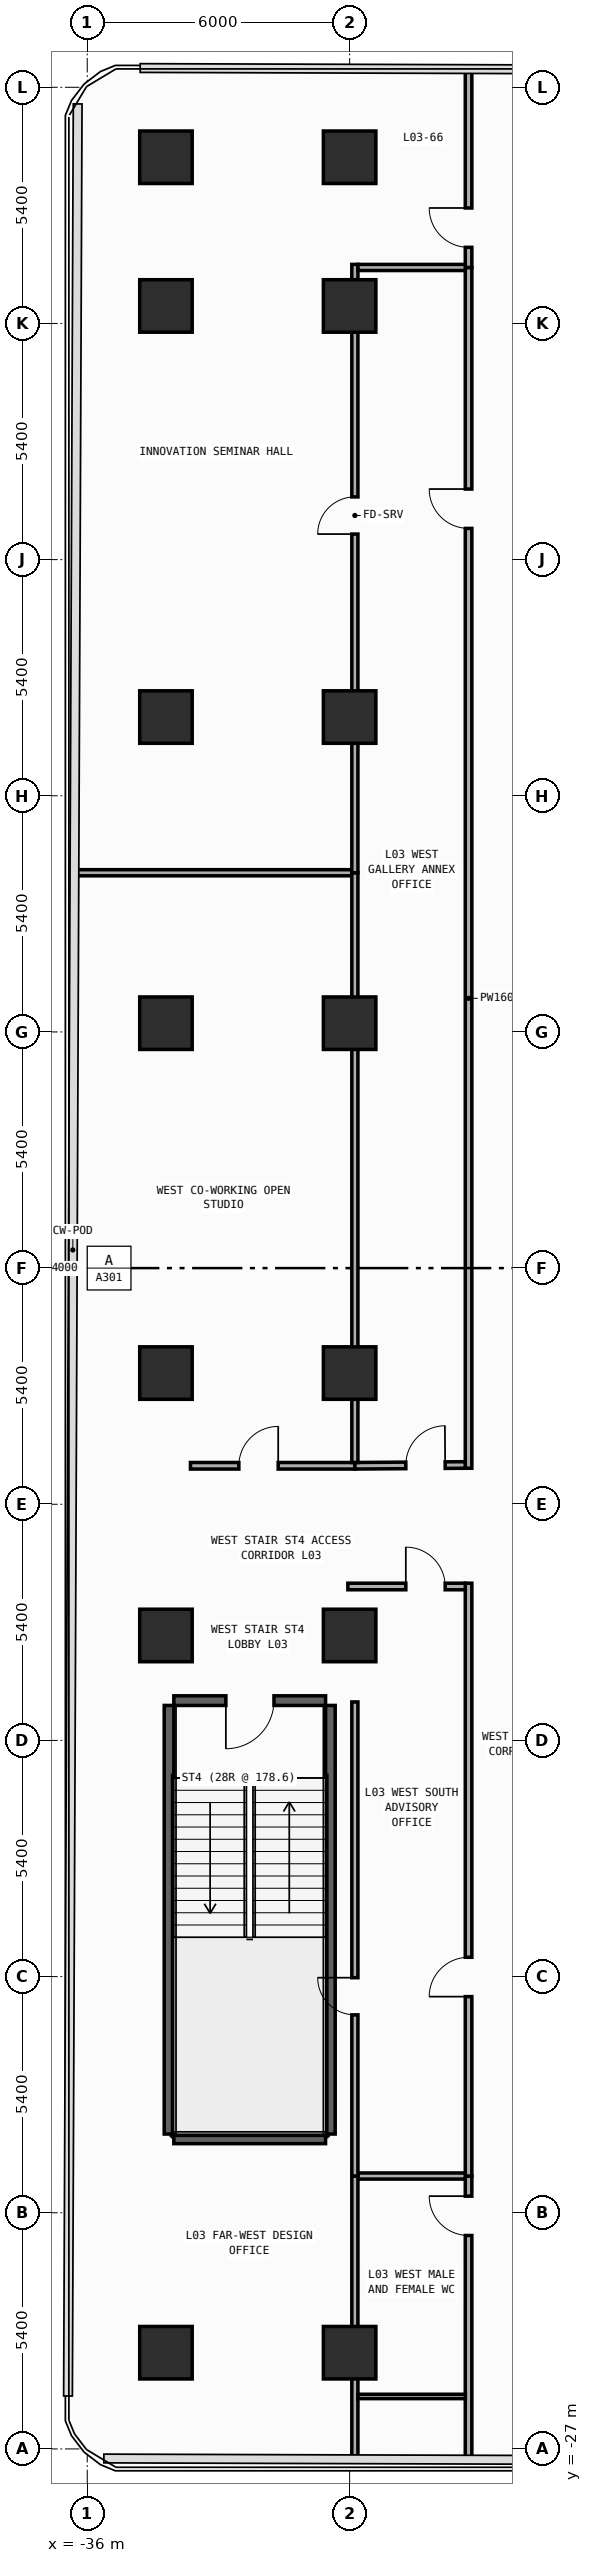
"""IFC4 building model, lengths in metres.
Left out: names, types, materials, properties, quantities, classifications, styles, units other than length and angle.
Written with IfcOpenShell. Run it as: python <this file> out.ifc"""

import sys

from ifc_helpers import new_model, si_unit, direction, frame, frame_2d, origin, origin_2d, place, context, subcontext, project, spatial, rectangle, extrude, element, fill, save


model = new_model("IFC4")
c1 = context("Model", 3, precision=1e-05, world=origin(), true_north=direction((0.0, 1.0)))
c2 = subcontext(c1, "Body", "Model", "MODEL_VIEW")
j1 = project(units=[si_unit("LENGTHUNIT", "METRE"), si_unit("PLANEANGLEUNIT", "RADIAN")], contexts=[c1])
p1 = place(None, origin())
s1 = spatial("IfcSite", under=j1, at=p1, CompositionType="ELEMENT")
p2 = place(p1, origin())
s2 = spatial("IfcBuilding", under=s1, at=p2, CompositionType="ELEMENT")
p3 = place(p2, frame((0.0, 0.0, 11.0)))
s3 = spatial("IfcBuildingStorey", under=s2, at=p3, CompositionType="ELEMENT", Elevation=11.0)
p4 = place(p3, frame((-30.55, -9.89, 0.0), z_axis=(0.0, 0.0, 1.0), x_axis=(-1.0, 0.0, 0.0)))
e1 = element("IfcWall", 1, at=p4, inside=s3, PredefinedType="SHEAR", context=c2, shape_type="SweptSolid", body=[
    extrude(rectangle(XDim=3.47, YDim=0.22, at=frame_2d((1.735, 0.0))), origin(), (0.0, 0.0, 1.0), 4.7),
])
p5 = place(p4, frame((1.18, 0.0, 0.0)))
e2 = element("IfcOpeningElement", 2, at=p5, cuts=e1, PredefinedType="OPENING", context=c2, shape_type="SweptSolid", body=[
    extrude(rectangle(XDim=1.1, YDim=2.2, at=frame_2d((0.55, 1.1))), frame((0.0, 0.12, 0.0), z_axis=(0.0, -1.0, 0.0), x_axis=(1.0, 0.0, 0.0)), (0.0, 0.0, 1.0), 0.24),
])
p6 = place(p3, frame((-34.02, -19.91, 0.0), z_axis=(0.0, 0.0, 1.0), x_axis=(1.0, 0.0, 0.0)))
e3 = element("IfcWall", 3, at=p6, inside=s3, PredefinedType="SHEAR", context=c2, shape_type="SweptSolid", body=[
    extrude(rectangle(XDim=3.47, YDim=0.22, at=frame_2d((1.735, 0.0))), origin(), (0.0, 0.0, 1.0), 4.7),
])
for number, where, z_axis, x_axis in (
    (4, (-34.13, -19.8, 0.0), (0.0, 0.0, 1.0), (0.0, 1.0, 0.0)),
    (5, (-30.44, -19.8, 0.0), (0.0, 0.0, 1.0), (0.0, 1.0, 0.0)),
):
    element("IfcWall", number, at=place(p3, frame(where, z_axis=z_axis, x_axis=x_axis)), inside=s3, PredefinedType="SHEAR", context=c2, shape_type="SweptSolid", body=[
        extrude(rectangle(XDim=9.8, YDim=0.22, at=frame_2d((4.9, 0.0))), origin(), (0.0, 0.0, 1.0), 4.7),
    ])
for number, where, z_axis, x_axis in (
    (6, (-34.2, -24.8, 0.0), (0.0, 0.0, 1.0), (1.0, 0.0, 0.0)),
    (7, (-34.2, -8.4, 0.0), (0.0, 0.0, 1.0), (1.0, 0.0, 0.0)),
    (8, (-34.2, -2.4, 0.0), (0.0, 0.0, 1.0), (1.0, 0.0, 0.0)),
    (9, (-34.2, 5.6, 0.0), (0.0, 0.0, 1.0), (1.0, 0.0, 0.0)),
    (10, (-34.2, 12.6, 0.0), (0.0, 0.0, 1.0), (1.0, 0.0, 0.0)),
    (11, (-34.2, 22.0, 0.0), (0.0, 0.0, 1.0), (1.0, 0.0, 0.0)),
    (12, (-34.2, 25.4, 0.0), (0.0, 0.0, 1.0), (1.0, 0.0, 0.0)),
    (13, (-30.0, -24.8, 0.0), (0.0, 0.0, 1.0), (1.0, 0.0, 0.0)),
    (14, (-30.0, -8.4, 0.0), (0.0, 0.0, 1.0), (1.0, 0.0, 0.0)),
    (15, (-30.0, -2.4, 0.0), (0.0, 0.0, 1.0), (1.0, 0.0, 0.0)),
    (16, (-30.0, 5.6, 0.0), (0.0, 0.0, 1.0), (1.0, 0.0, 0.0)),
    (17, (-30.0, 12.6, 0.0), (0.0, 0.0, 1.0), (1.0, 0.0, 0.0)),
    (18, (-30.0, 22.0, 0.0), (0.0, 0.0, 1.0), (1.0, 0.0, 0.0)),
    (19, (-30.0, 25.4, 0.0), (0.0, 0.0, 1.0), (1.0, 0.0, 0.0)),
):
    element("IfcColumn", number, at=place(p3, frame(where, z_axis=z_axis, x_axis=x_axis)), inside=s3, PredefinedType="COLUMN", context=c2, shape_type="SweptSolid", body=[
        extrude(rectangle(XDim=1.2, YDim=1.2, at=origin_2d()), origin(), (0.0, 0.0, 1.0), 5.0),
    ])
p7 = place(p3, frame((-27.28, -27.249, 0.0), z_axis=(0.0, 0.0, 1.0), x_axis=(0.0, 1.0, 0.0)))
e20 = element("IfcWall", 20, at=p7, inside=s3, PredefinedType="PARTITIONING", context=c2, shape_type="SweptSolid", body=[
    extrude(rectangle(XDim=6.489, YDim=0.15, at=frame_2d((3.245, 0.0))), origin(), (0.0, 0.0, 1.0), 4.7),
])
p8 = place(p7, frame((5.129, 0.0, 0.0)))
e21 = element("IfcOpeningElement", 21, at=p8, cuts=e20, PredefinedType="OPENING", context=c2, shape_type="SweptSolid", body=[
    extrude(rectangle(XDim=0.9, YDim=2.15, at=frame_2d((0.45, 1.075))), frame((0.0, 0.085, 0.0), z_axis=(0.0, -1.0, 0.0), x_axis=(1.0, 0.0, 0.0)), (0.0, 0.0, 1.0), 0.17),
])
p9 = place(p3, frame((-27.28, -20.76, 0.0), z_axis=(0.0, 0.0, 1.0), x_axis=(0.0, 1.0, 0.0)))
e22 = element("IfcWall", 22, at=p9, inside=s3, PredefinedType="PARTITIONING", context=c2, shape_type="SweptSolid", body=[
    extrude(rectangle(XDim=13.555, YDim=0.15, at=frame_2d((6.777, 0.0))), origin(), (0.0, 0.0, 1.0), 4.7),
])
p10 = place(p9, frame((4.102, 0.0, 0.0)))
e23 = element("IfcOpeningElement", 23, at=p10, cuts=e22, PredefinedType="OPENING", context=c2, shape_type="SweptSolid", body=[
    extrude(rectangle(XDim=0.9, YDim=2.15, at=frame_2d((0.45, 1.075))), frame((0.0, 0.085, 0.0), z_axis=(0.0, -1.0, 0.0), x_axis=(1.0, 0.0, 0.0)), (0.0, 0.0, 1.0), 0.17),
])
p11 = place(p3, frame((-27.28, -4.576, 0.0), z_axis=(0.0, 0.0, 1.0), x_axis=(0.0, 1.0, 0.0)))
e24 = element("IfcWall", 24, at=p11, inside=s3, PredefinedType="PARTITIONING", context=c2, shape_type="SweptSolid", body=[
    extrude(rectangle(XDim=27.456, YDim=0.15, at=frame_2d((13.728, 0.0))), origin(), (0.0, 0.0, 1.0), 4.7),
])
p12 = place(p11, frame((21.49, 0.0, 0.0)))
e25 = element("IfcOpeningElement", 25, at=p12, cuts=e24, PredefinedType="OPENING", context=c2, shape_type="SweptSolid", body=[
    extrude(rectangle(XDim=0.9, YDim=2.15, at=frame_2d((0.45, 1.075))), frame((0.0, 0.085, 0.0), z_axis=(0.0, -1.0, 0.0), x_axis=(1.0, 0.0, 0.0)), (0.0, 0.0, 1.0), 0.17),
])
p13 = place(p3, frame((-27.28, 22.88, 0.0), z_axis=(0.0, 0.0, 1.0), x_axis=(0.0, 1.0, 0.0)))
e26 = element("IfcWall", 26, at=p13, inside=s3, PredefinedType="PARTITIONING", context=c2, shape_type="SweptSolid", body=[
    extrude(rectangle(XDim=4.542, YDim=0.15, at=frame_2d((2.271, 0.0))), origin(), (0.0, 0.0, 1.0), 4.7),
])
p14 = place(p13, frame((0.46, 0.0, 0.0)))
e27 = element("IfcOpeningElement", 27, at=p14, cuts=e26, PredefinedType="OPENING", context=c2, shape_type="SweptSolid", body=[
    extrude(rectangle(XDim=0.9, YDim=2.15, at=frame_2d((0.45, 1.075))), frame((0.0, 0.085, 0.0), z_axis=(0.0, -1.0, 0.0), x_axis=(1.0, 0.0, 0.0)), (0.0, 0.0, 1.0), 0.17),
])
p15 = place(p3, frame((-33.64, -4.52, 0.0), z_axis=(0.0, 0.0, 1.0), x_axis=(1.0, 0.0, 0.0)))
e28 = element("IfcWall", 28, at=p15, inside=s3, PredefinedType="PARTITIONING", context=c2, shape_type="SweptSolid", body=[
    extrude(rectangle(XDim=3.76, YDim=0.15, at=frame_2d((1.88, 0.0))), origin(), (0.0, 0.0, 1.0), 4.7),
])
p16 = place(p15, frame((1.107, 0.0, 0.0)))
e29 = element("IfcOpeningElement", 29, at=p16, cuts=e28, PredefinedType="OPENING", context=c2, shape_type="SweptSolid", body=[
    extrude(rectangle(XDim=0.9, YDim=2.15, at=frame_2d((0.45, 1.075))), frame((0.0, 0.085, 0.0), z_axis=(0.0, -1.0, 0.0), x_axis=(1.0, 0.0, 0.0)), (0.0, 0.0, 1.0), 0.17),
])
p17 = place(p3, frame((-30.04, -7.28, 0.0), z_axis=(0.0, 0.0, 1.0), x_axis=(1.0, 0.0, 0.0)))
e30 = element("IfcWall", 30, at=p17, inside=s3, PredefinedType="PARTITIONING", context=c2, shape_type="SweptSolid", body=[
    extrude(rectangle(XDim=2.685, YDim=0.15, at=frame_2d((1.343, 0.0))), origin(), (0.0, 0.0, 1.0), 4.7),
])
p18 = place(p17, frame((1.325, 0.0, 0.0)))
e31 = element("IfcOpeningElement", 31, at=p18, cuts=e30, PredefinedType="OPENING", context=c2, shape_type="SweptSolid", body=[
    extrude(rectangle(XDim=0.9, YDim=2.15, at=frame_2d((0.45, 1.075))), frame((0.0, 0.085, 0.0), z_axis=(0.0, -1.0, 0.0), x_axis=(1.0, 0.0, 0.0)), (0.0, 0.0, 1.0), 0.17),
])
p19 = place(p3, frame((-29.88, -4.52, 0.0), z_axis=(0.0, 0.0, 1.0), x_axis=(0.999973705414, 0.007251791521, 0.0)))
e32 = element("IfcWall", 32, at=p19, inside=s3, PredefinedType="PARTITIONING", context=c2, shape_type="SweptSolid", body=[
    extrude(rectangle(XDim=2.525, YDim=0.15, at=frame_2d((1.262, 0.0))), origin(), (0.0, 0.0, 1.0), 4.7),
])
p20 = place(p19, frame((1.165, 0.0, 0.0)))
e33 = element("IfcOpeningElement", 33, at=p20, cuts=e32, PredefinedType="OPENING", context=c2, shape_type="SweptSolid", body=[
    extrude(rectangle(XDim=0.9, YDim=2.15, at=frame_2d((0.45, 1.075))), frame((0.0, 0.085, 0.0), z_axis=(0.0, -1.0, 0.0), x_axis=(1.0, 0.0, 0.0)), (0.0, 0.0, 1.0), 0.17),
])
p21 = place(p3, frame((-36.297, 9.04, 0.0), z_axis=(0.0, 0.0, 1.0), x_axis=(1.0, 0.0, 0.0)))
e34 = element("IfcWall", 34, at=p21, inside=s3, PredefinedType="PARTITIONING", context=c2, shape_type="SweptSolid", body=[
    extrude(rectangle(XDim=6.347, YDim=0.14, at=frame_2d((3.174, 0.0))), origin(), (0.0, 0.0, 1.0), 4.7),
])
p22 = place(p3, frame((-29.88, -4.445, 0.0), z_axis=(0.0, 0.0, 1.0), x_axis=(0.0, 1.0, 0.0)))
e35 = element("IfcWall", 35, at=p22, inside=s3, PredefinedType="PARTITIONING", context=c2, shape_type="SweptSolid", body=[
    extrude(rectangle(XDim=13.485, YDim=0.14, at=frame_2d((6.743, 0.0))), origin(), (0.0, 0.0, 1.0), 3.8),
])
p23 = place(p3, frame((-29.88, 9.04, 0.0), z_axis=(0.0, 0.0, 1.0), x_axis=(0.0, 1.0, 0.0)))
e36 = element("IfcWall", 36, at=p23, inside=s3, PredefinedType="PARTITIONING", context=c2, shape_type="SweptSolid", body=[
    extrude(rectangle(XDim=13.91, YDim=0.14, at=frame_2d((6.955, 0.0))), origin(), (0.0, 0.0, 1.0), 3.8),
])
p24 = place(p23, frame((7.744, 0.0, 0.0)))
e37 = element("IfcOpeningElement", 37, at=p24, cuts=e36, PredefinedType="OPENING", context=c2, shape_type="SweptSolid", body=[
    extrude(rectangle(XDim=0.85, YDim=2.1, at=frame_2d((0.425, 1.05))), frame((0.0, 0.08, 0.0), z_axis=(0.0, -1.0, 0.0), x_axis=(1.0, 0.0, 0.0)), (0.0, 0.0, 1.0), 0.16),
])
p25 = place(p3, frame((-29.81, -20.76, 0.0), z_axis=(0.0, 0.0, 1.0), x_axis=(1.0, 0.0, 0.0)))
e38 = element("IfcWall", 38, at=p25, inside=s3, PredefinedType="PARTITIONING", context=c2, shape_type="SweptSolid", body=[
    extrude(rectangle(XDim=2.455, YDim=0.14, at=frame_2d((1.228, 0.0))), origin(), (0.0, 0.0, 1.0), 4.7),
])
p26 = place(p3, frame((-29.88, -27.241, 0.0), z_axis=(0.0, 0.0, 1.0), x_axis=(0.0, 1.0, 0.0)))
e39 = element("IfcWall", 39, at=p26, inside=s3, PredefinedType="PARTITIONING", context=c2, shape_type="SweptSolid", body=[
    extrude(rectangle(XDim=6.481, YDim=0.14, at=frame_2d((3.24, 0.0))), origin(), (0.0, 0.0, 1.0), 4.7),
])
p27 = place(p3, frame((-29.88, -20.76, 0.0), z_axis=(0.0, 0.0, 1.0), x_axis=(0.0, 1.0, 0.0)))
e40 = element("IfcWall", 40, at=p27, inside=s3, PredefinedType="PARTITIONING", context=c2, shape_type="SweptSolid", body=[
    extrude(rectangle(XDim=10.84, YDim=0.14, at=frame_2d((5.42, 0.0))), origin(), (0.0, 0.0, 1.0), 4.7),
])
p28 = place(p27, frame((3.685, 0.0, 0.0)))
e41 = element("IfcOpeningElement", 41, at=p28, cuts=e40, PredefinedType="OPENING", context=c2, shape_type="SweptSolid", body=[
    extrude(rectangle(XDim=0.85, YDim=2.1, at=frame_2d((0.425, 1.05))), frame((0.0, 0.08, 0.0), z_axis=(0.0, -1.0, 0.0), x_axis=(1.0, 0.0, 0.0)), (0.0, 0.0, 1.0), 0.16),
])
p29 = place(p3, frame((-29.81, 22.88, 0.0), z_axis=(0.0, 0.0, 1.0), x_axis=(1.0, 0.0, 0.0)))
e42 = element("IfcWall", 42, at=p29, inside=s3, PredefinedType="PARTITIONING", context=c2, shape_type="SweptSolid", body=[
    extrude(rectangle(XDim=2.455, YDim=0.14, at=frame_2d((1.228, 0.0))), origin(), (0.0, 0.0, 1.0), 4.7),
])
p30 = place(p3, frame((-27.355, -25.8, 0.0), z_axis=(0.0, 0.0, 1.0), x_axis=(-1.0, 0.0, 0.0)))
e43 = element("IfcWall", 43, at=p30, inside=s3, PredefinedType="PARTITIONING", context=c2, shape_type="SweptSolid", body=[
    extrude(rectangle(XDim=2.455, YDim=0.1, at=frame_2d((1.228, 0.0))), origin(), (0.0, 0.0, 1.0), 4.7),
])
p31 = place(p5, origin())
e44 = element("IfcDoor", 44, at=p31, inside=s3, OperationType="SINGLE_SWING_RIGHT", PredefinedType="DOOR", context=c2, shape_type="SweptSolid", body=[
    extrude(rectangle(XDim=1.1, YDim=2.2, at=frame_2d((0.55, 1.1))), frame((0.0, 0.025, 0.0), z_axis=(0.0, -1.0, 0.0), x_axis=(1.0, 0.0, 0.0)), (0.0, 0.0, 1.0), 0.05),
])
fill(e2, e44)
p32 = place(p8, origin())
e45 = element("IfcDoor", 45, at=p32, inside=s3, OperationType="SINGLE_SWING_RIGHT", PredefinedType="DOOR", context=c2, shape_type="SweptSolid", body=[
    extrude(rectangle(XDim=0.9, YDim=2.15, at=frame_2d((0.45, 1.075))), frame((0.0, 0.025, 0.0), z_axis=(0.0, -1.0, 0.0), x_axis=(1.0, 0.0, 0.0)), (0.0, 0.0, 1.0), 0.05),
])
fill(e21, e45)
p33 = place(p10, origin())
e46 = element("IfcDoor", 46, at=p33, inside=s3, OperationType="SINGLE_SWING_LEFT", PredefinedType="DOOR", context=c2, shape_type="SweptSolid", body=[
    extrude(rectangle(XDim=0.9, YDim=2.15, at=frame_2d((0.45, 1.075))), frame((0.0, 0.025, 0.0), z_axis=(0.0, -1.0, 0.0), x_axis=(1.0, 0.0, 0.0)), (0.0, 0.0, 1.0), 0.05),
])
fill(e23, e46)
p34 = place(p12, origin())
e47 = element("IfcDoor", 47, at=p34, inside=s3, OperationType="SINGLE_SWING_RIGHT", PredefinedType="DOOR", context=c2, shape_type="SweptSolid", body=[
    extrude(rectangle(XDim=0.9, YDim=2.15, at=frame_2d((0.45, 1.075))), frame((0.0, 0.025, 0.0), z_axis=(0.0, -1.0, 0.0), x_axis=(1.0, 0.0, 0.0)), (0.0, 0.0, 1.0), 0.05),
])
fill(e25, e47)
p35 = place(p14, origin())
e48 = element("IfcDoor", 48, at=p35, inside=s3, OperationType="SINGLE_SWING_RIGHT", PredefinedType="DOOR", context=c2, shape_type="SweptSolid", body=[
    extrude(rectangle(XDim=0.9, YDim=2.15, at=frame_2d((0.45, 1.075))), frame((0.0, 0.025, 0.0), z_axis=(0.0, -1.0, 0.0), x_axis=(1.0, 0.0, 0.0)), (0.0, 0.0, 1.0), 0.05),
])
fill(e27, e48)
p36 = place(p16, origin())
e49 = element("IfcDoor", 49, at=p36, inside=s3, OperationType="SINGLE_SWING_RIGHT", PredefinedType="DOOR", context=c2, shape_type="SweptSolid", body=[
    extrude(rectangle(XDim=0.9, YDim=2.15, at=frame_2d((0.45, 1.075))), frame((0.0, 0.025, 0.0), z_axis=(0.0, -1.0, 0.0), x_axis=(1.0, 0.0, 0.0)), (0.0, 0.0, 1.0), 0.05),
])
fill(e29, e49)
p37 = place(p18, origin())
e50 = element("IfcDoor", 50, at=p37, inside=s3, OperationType="SINGLE_SWING_LEFT", PredefinedType="DOOR", context=c2, shape_type="SweptSolid", body=[
    extrude(rectangle(XDim=0.9, YDim=2.15, at=frame_2d((0.45, 1.075))), frame((0.0, 0.025, 0.0), z_axis=(0.0, -1.0, 0.0), x_axis=(1.0, 0.0, 0.0)), (0.0, 0.0, 1.0), 0.05),
])
fill(e31, e50)
p38 = place(p20, origin())
e51 = element("IfcDoor", 51, at=p38, inside=s3, OperationType="SINGLE_SWING_RIGHT", PredefinedType="DOOR", context=c2, shape_type="SweptSolid", body=[
    extrude(rectangle(XDim=0.9, YDim=2.15, at=frame_2d((0.45, 1.075))), frame((0.0, 0.025, 0.0), z_axis=(0.0, -1.0, 0.0), x_axis=(1.0, 0.0, 0.0)), (0.0, 0.0, 1.0), 0.05),
])
fill(e33, e51)
p39 = place(p24, origin())
e52 = element("IfcDoor", 52, at=p39, inside=s3, OperationType="SINGLE_SWING_LEFT", PredefinedType="DOOR", context=c2, shape_type="SweptSolid", body=[
    extrude(rectangle(XDim=0.85, YDim=2.1, at=frame_2d((0.425, 1.05))), frame((0.0, 0.025, 0.0), z_axis=(0.0, -1.0, 0.0), x_axis=(1.0, 0.0, 0.0)), (0.0, 0.0, 1.0), 0.05),
])
fill(e37, e52)
p40 = place(p28, origin())
e53 = element("IfcDoor", 53, at=p40, inside=s3, OperationType="SINGLE_SWING_RIGHT", PredefinedType="DOOR", context=c2, shape_type="SweptSolid", body=[
    extrude(rectangle(XDim=0.85, YDim=2.1, at=frame_2d((0.425, 1.05))), frame((0.0, 0.025, 0.0), z_axis=(0.0, -1.0, 0.0), x_axis=(1.0, 0.0, 0.0)), (0.0, 0.0, 1.0), 0.05),
])
fill(e41, e53)
save(model, sys.argv[1])
